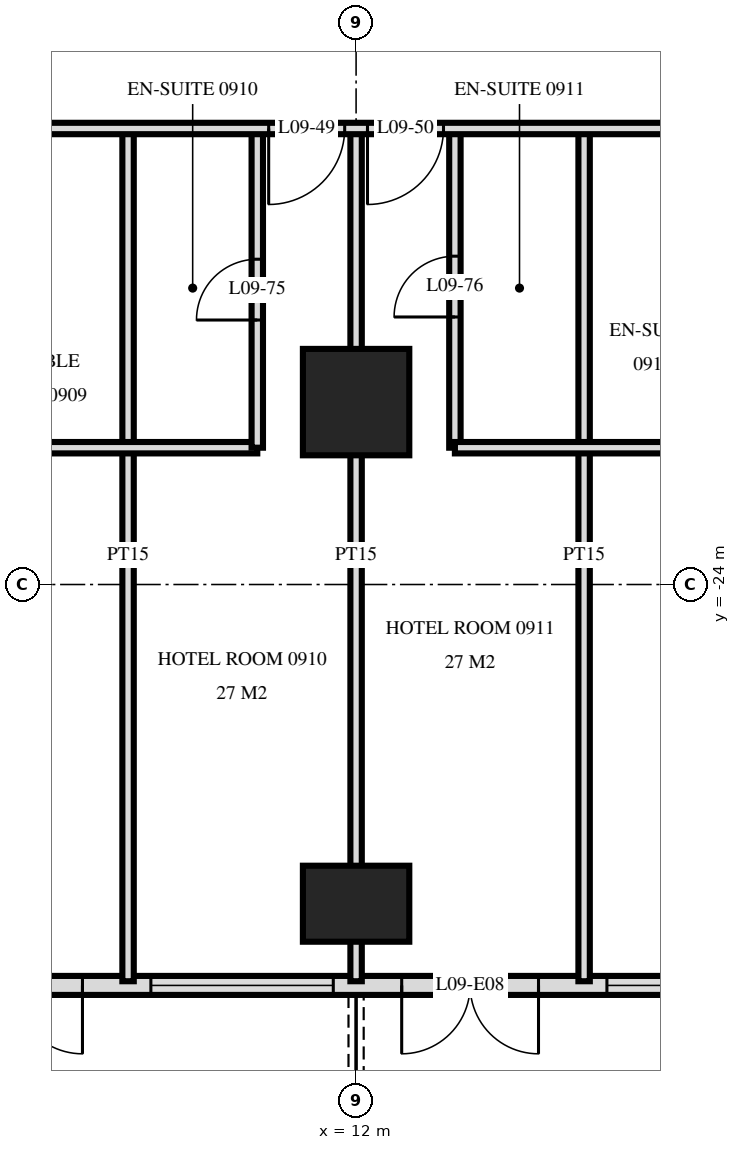
"""IFC4 building model, lengths in metres.
Left out: names, types, materials, properties, quantities, classifications, styles, units other than length and angle.
Written with IfcOpenShell. Run it as: python <this file> out.ifc"""

import sys

from ifc_helpers import new_model, si_unit, direction, frame, frame_2d, origin, origin_2d, place, context, subcontext, project, spatial, rectangle, extrude, element, fill, save


model = new_model("IFC4")
c1 = context("Model", 3, precision=1e-05, world=origin(), true_north=direction((0.0, 1.0)))
c2 = subcontext(c1, "Body", "Model", "MODEL_VIEW")
j1 = project(units=[si_unit("LENGTHUNIT", "METRE"), si_unit("PLANEANGLEUNIT", "RADIAN")], contexts=[c1])
p1 = place(None, origin())
s1 = spatial("IfcSite", under=j1, at=p1, CompositionType="ELEMENT")
p2 = place(p1, origin())
s2 = spatial("IfcBuilding", under=s1, at=p2, CompositionType="ELEMENT")
p3 = place(p2, frame((0.0, 0.0, 42.0)))
s3 = spatial("IfcBuildingStorey", under=s2, at=p3, CompositionType="ELEMENT", Elevation=42.0)
p4 = place(p3, frame((12.0, -28.2, 0.0), z_axis=(0.0, 0.0, 1.0), x_axis=(1.0, 0.0, 0.0)))
e1 = element("IfcColumn", 1, at=p4, inside=s3, PredefinedType="COLUMN", context=c2, shape_type="SweptSolid", body=[
    extrude(rectangle(XDim=1.4, YDim=1.0, at=origin_2d()), origin(), (0.0, 0.0, 1.0), 3.6),
])
p5 = place(p3, frame((12.0, -21.6, 0.0), z_axis=(0.0, 0.0, 1.0), x_axis=(1.0, 0.0, 0.0)))
e2 = element("IfcColumn", 2, at=p5, inside=s3, PredefinedType="COLUMN", context=c2, shape_type="SweptSolid", body=[
    extrude(rectangle(XDim=1.4, YDim=1.4, at=origin_2d()), origin(), (0.0, 0.0, 1.0), 3.6),
])
p6 = place(p3, frame((-28.775, -29.275, 0.0), z_axis=(0.0, 0.0, 1.0), x_axis=(1.0, 0.0, 0.0)))
e3 = element("IfcWall", 3, at=p6, inside=s3, PredefinedType="SOLIDWALL", context=c2, shape_type="SweptSolid", body=[
    extrude(rectangle(XDim=57.551, YDim=0.25, at=frame_2d((28.775, 0.0))), origin(), (0.0, 0.0, 1.0), 3.32),
])
p7 = place(p6, frame((0.575, 0.0, 0.0)))
e4 = element("IfcOpeningElement", 4, at=p7, cuts=e3, PredefinedType="OPENING", context=c2, shape_type="SweptSolid", body=[
    extrude(rectangle(XDim=1.8, YDim=2.4, at=frame_2d((0.9, 1.2))), frame((0.0, 0.135, 0.0), z_axis=(0.0, -1.0, 0.0), x_axis=(1.0, 0.0, 0.0)), (0.0, 0.0, 1.0), 0.27),
])
p8 = place(p6, frame((5.375, 0.0, 0.0)))
e5 = element("IfcOpeningElement", 5, at=p8, cuts=e3, PredefinedType="OPENING", context=c2, shape_type="SweptSolid", body=[
    extrude(rectangle(XDim=1.8, YDim=2.4, at=frame_2d((0.9, 1.2))), frame((0.0, 0.135, 0.0), z_axis=(0.0, -1.0, 0.0), x_axis=(1.0, 0.0, 0.0)), (0.0, 0.0, 1.0), 0.27),
])
p9 = place(p6, frame((8.075, 0.0, 0.3)))
e6 = element("IfcOpeningElement", 6, at=p9, cuts=e3, PredefinedType="OPENING", context=c2, shape_type="SweptSolid", body=[
    extrude(rectangle(XDim=2.4, YDim=2.1, at=frame_2d((1.2, 1.05))), frame((0.0, 0.135, 0.0), z_axis=(0.0, -1.0, 0.0), x_axis=(1.0, 0.0, 0.0)), (0.0, 0.0, 1.0), 0.27),
])
p10 = place(p6, frame((11.375, 0.0, 0.0)))
e7 = element("IfcOpeningElement", 7, at=p10, cuts=e3, PredefinedType="OPENING", context=c2, shape_type="SweptSolid", body=[
    extrude(rectangle(XDim=1.8, YDim=2.4, at=frame_2d((0.9, 1.2))), frame((0.0, 0.135, 0.0), z_axis=(0.0, -1.0, 0.0), x_axis=(1.0, 0.0, 0.0)), (0.0, 0.0, 1.0), 0.27),
])
p11 = place(p6, frame((14.075, 0.0, 0.3)))
e8 = element("IfcOpeningElement", 8, at=p11, cuts=e3, PredefinedType="OPENING", context=c2, shape_type="SweptSolid", body=[
    extrude(rectangle(XDim=2.4, YDim=2.1, at=frame_2d((1.2, 1.05))), frame((0.0, 0.135, 0.0), z_axis=(0.0, -1.0, 0.0), x_axis=(1.0, 0.0, 0.0)), (0.0, 0.0, 1.0), 0.27),
])
p12 = place(p6, frame((17.375, 0.0, 0.0)))
e9 = element("IfcOpeningElement", 9, at=p12, cuts=e3, PredefinedType="OPENING", context=c2, shape_type="SweptSolid", body=[
    extrude(rectangle(XDim=1.8, YDim=2.4, at=frame_2d((0.9, 1.2))), frame((0.0, 0.135, 0.0), z_axis=(0.0, -1.0, 0.0), x_axis=(1.0, 0.0, 0.0)), (0.0, 0.0, 1.0), 0.27),
])
p13 = place(p6, frame((20.075, 0.0, 0.3)))
e10 = element("IfcOpeningElement", 10, at=p13, cuts=e3, PredefinedType="OPENING", context=c2, shape_type="SweptSolid", body=[
    extrude(rectangle(XDim=2.4, YDim=2.1, at=frame_2d((1.2, 1.05))), frame((0.0, 0.135, 0.0), z_axis=(0.0, -1.0, 0.0), x_axis=(1.0, 0.0, 0.0)), (0.0, 0.0, 1.0), 0.27),
])
p14 = place(p6, frame((23.075, 0.0, 0.3)))
e11 = element("IfcOpeningElement", 11, at=p14, cuts=e3, PredefinedType="OPENING", context=c2, shape_type="SweptSolid", body=[
    extrude(rectangle(XDim=2.4, YDim=2.1, at=frame_2d((1.2, 1.05))), frame((0.0, 0.135, 0.0), z_axis=(0.0, -1.0, 0.0), x_axis=(1.0, 0.0, 0.0)), (0.0, 0.0, 1.0), 0.27),
])
p15 = place(p6, frame((26.375, 0.0, 0.0)))
e12 = element("IfcOpeningElement", 12, at=p15, cuts=e3, PredefinedType="OPENING", context=c2, shape_type="SweptSolid", body=[
    extrude(rectangle(XDim=1.8, YDim=2.4, at=frame_2d((0.9, 1.2))), frame((0.0, 0.135, 0.0), z_axis=(0.0, -1.0, 0.0), x_axis=(1.0, 0.0, 0.0)), (0.0, 0.0, 1.0), 0.27),
])
p16 = place(p6, frame((29.375, 0.0, 0.0)))
e13 = element("IfcOpeningElement", 13, at=p16, cuts=e3, PredefinedType="OPENING", context=c2, shape_type="SweptSolid", body=[
    extrude(rectangle(XDim=1.8, YDim=2.4, at=frame_2d((0.9, 1.2))), frame((0.0, 0.135, 0.0), z_axis=(0.0, -1.0, 0.0), x_axis=(1.0, 0.0, 0.0)), (0.0, 0.0, 1.0), 0.27),
])
p17 = place(p6, frame((32.075, 0.0, 0.3)))
e14 = element("IfcOpeningElement", 14, at=p17, cuts=e3, PredefinedType="OPENING", context=c2, shape_type="SweptSolid", body=[
    extrude(rectangle(XDim=2.4, YDim=2.1, at=frame_2d((1.2, 1.05))), frame((0.0, 0.135, 0.0), z_axis=(0.0, -1.0, 0.0), x_axis=(1.0, 0.0, 0.0)), (0.0, 0.0, 1.0), 0.27),
])
p18 = place(p6, frame((35.375, 0.0, 0.0)))
e15 = element("IfcOpeningElement", 15, at=p18, cuts=e3, PredefinedType="OPENING", context=c2, shape_type="SweptSolid", body=[
    extrude(rectangle(XDim=1.8, YDim=2.4, at=frame_2d((0.9, 1.2))), frame((0.0, 0.135, 0.0), z_axis=(0.0, -1.0, 0.0), x_axis=(1.0, 0.0, 0.0)), (0.0, 0.0, 1.0), 0.27),
])
p19 = place(p6, frame((38.075, 0.0, 0.3)))
e16 = element("IfcOpeningElement", 16, at=p19, cuts=e3, PredefinedType="OPENING", context=c2, shape_type="SweptSolid", body=[
    extrude(rectangle(XDim=2.4, YDim=2.1, at=frame_2d((1.2, 1.05))), frame((0.0, 0.135, 0.0), z_axis=(0.0, -1.0, 0.0), x_axis=(1.0, 0.0, 0.0)), (0.0, 0.0, 1.0), 0.27),
])
p20 = place(p6, frame((41.375, 0.0, 0.0)))
e17 = element("IfcOpeningElement", 17, at=p20, cuts=e3, PredefinedType="OPENING", context=c2, shape_type="SweptSolid", body=[
    extrude(rectangle(XDim=1.8, YDim=2.4, at=frame_2d((0.9, 1.2))), frame((0.0, 0.135, 0.0), z_axis=(0.0, -1.0, 0.0), x_axis=(1.0, 0.0, 0.0)), (0.0, 0.0, 1.0), 0.27),
])
p21 = place(p6, frame((44.075, 0.0, 0.3)))
e18 = element("IfcOpeningElement", 18, at=p21, cuts=e3, PredefinedType="OPENING", context=c2, shape_type="SweptSolid", body=[
    extrude(rectangle(XDim=2.4, YDim=2.1, at=frame_2d((1.2, 1.05))), frame((0.0, 0.135, 0.0), z_axis=(0.0, -1.0, 0.0), x_axis=(1.0, 0.0, 0.0)), (0.0, 0.0, 1.0), 0.27),
])
p22 = place(p6, frame((47.375, 0.0, 0.0)))
e19 = element("IfcOpeningElement", 19, at=p22, cuts=e3, PredefinedType="OPENING", context=c2, shape_type="SweptSolid", body=[
    extrude(rectangle(XDim=1.8, YDim=2.4, at=frame_2d((0.9, 1.2))), frame((0.0, 0.135, 0.0), z_axis=(0.0, -1.0, 0.0), x_axis=(1.0, 0.0, 0.0)), (0.0, 0.0, 1.0), 0.27),
])
p23 = place(p6, frame((50.075, 0.0, 0.3)))
e20 = element("IfcOpeningElement", 20, at=p23, cuts=e3, PredefinedType="OPENING", context=c2, shape_type="SweptSolid", body=[
    extrude(rectangle(XDim=2.4, YDim=2.1, at=frame_2d((1.2, 1.05))), frame((0.0, 0.135, 0.0), z_axis=(0.0, -1.0, 0.0), x_axis=(1.0, 0.0, 0.0)), (0.0, 0.0, 1.0), 0.27),
])
p24 = place(p6, frame((53.375, 0.0, 0.0)))
e21 = element("IfcOpeningElement", 21, at=p24, cuts=e3, PredefinedType="OPENING", context=c2, shape_type="SweptSolid", body=[
    extrude(rectangle(XDim=1.8, YDim=2.4, at=frame_2d((0.9, 1.2))), frame((0.0, 0.135, 0.0), z_axis=(0.0, -1.0, 0.0), x_axis=(1.0, 0.0, 0.0)), (0.0, 0.0, 1.0), 0.27),
])
p25 = place(p3, frame((15.0, -29.22, 0.0), z_axis=(0.0, 0.0, 1.0), x_axis=(0.0, 1.0, 0.0)))
e22 = element("IfcWall", 22, at=p25, inside=s3, PredefinedType="PARTITIONING", context=c2, shape_type="SweptSolid", body=[
    extrude(rectangle(XDim=11.22, YDim=0.15, at=frame_2d((5.61, 0.0))), origin(), (0.0, 0.0, 1.0), 3.32),
])
p26 = place(p3, frame((13.3, -22.2, 0.0), z_axis=(0.0, 0.0, 1.0), x_axis=(0.0, 1.0, 0.0)))
e23 = element("IfcWall", 23, at=p26, inside=s3, PredefinedType="PARTITIONING", context=c2, shape_type="SweptSolid", body=[
    extrude(rectangle(XDim=4.2, YDim=0.15, at=frame_2d((2.1, 0.0))), origin(), (0.0, 0.0, 1.0), 3.32),
])
p27 = place(p26, frame((1.72, 0.0, 0.0)))
e24 = element("IfcOpeningElement", 24, at=p27, cuts=e23, PredefinedType="OPENING", context=c2, shape_type="SweptSolid", body=[
    extrude(rectangle(XDim=0.8, YDim=2.1, at=frame_2d((0.4, 1.05))), frame((0.0, 0.085, 0.0), z_axis=(0.0, -1.0, 0.0), x_axis=(1.0, 0.0, 0.0)), (0.0, 0.0, 1.0), 0.17),
])
p28 = place(p3, frame((12.0, -29.22, 0.0), z_axis=(0.0, 0.0, 1.0), x_axis=(0.0, 1.0, 0.0)))
e25 = element("IfcWall", 25, at=p28, inside=s3, PredefinedType="PARTITIONING", context=c2, shape_type="SweptSolid", body=[
    extrude(rectangle(XDim=11.22, YDim=0.15, at=frame_2d((5.61, 0.0))), origin(), (0.0, 0.0, 1.0), 3.32),
])
p29 = place(p3, frame((10.7, -22.2, 0.0), z_axis=(0.0, 0.0, 1.0), x_axis=(0.0, 1.0, 0.0)))
e26 = element("IfcWall", 26, at=p29, inside=s3, PredefinedType="PARTITIONING", context=c2, shape_type="SweptSolid", body=[
    extrude(rectangle(XDim=4.2, YDim=0.15, at=frame_2d((2.1, 0.0))), origin(), (0.0, 0.0, 1.0), 3.32),
])
p30 = place(p29, frame((1.68, 0.0, 0.0)))
e27 = element("IfcOpeningElement", 27, at=p30, cuts=e26, PredefinedType="OPENING", context=c2, shape_type="SweptSolid", body=[
    extrude(rectangle(XDim=0.8, YDim=2.1, at=frame_2d((0.4, 1.05))), frame((0.0, 0.085, 0.0), z_axis=(0.0, -1.0, 0.0), x_axis=(1.0, 0.0, 0.0)), (0.0, 0.0, 1.0), 0.17),
])
p31 = place(p3, frame((9.0, -29.22, 0.0), z_axis=(0.0, 0.0, 1.0), x_axis=(0.0, 1.0, 0.0)))
e28 = element("IfcWall", 28, at=p31, inside=s3, PredefinedType="PARTITIONING", context=c2, shape_type="SweptSolid", body=[
    extrude(rectangle(XDim=11.22, YDim=0.15, at=frame_2d((5.61, 0.0))), origin(), (0.0, 0.0, 1.0), 3.32),
])
for number, where, z_axis, x_axis in (
    (29, (6.3, -22.2, 0.0), (0.0, 0.0, 1.0), (1.0, 0.0, 0.0)),
    (30, (13.3, -22.2, 0.0), (0.0, 0.0, 1.0), (1.0, 0.0, 0.0)),
):
    element("IfcWall", number, at=place(p3, frame(where, z_axis=z_axis, x_axis=x_axis)), inside=s3, PredefinedType="PARTITIONING", context=c2, shape_type="SweptSolid", body=[
        extrude(rectangle(XDim=4.4, YDim=0.15, at=frame_2d((2.2, 0.0))), origin(), (0.0, 0.0, 1.0), 3.32),
    ])
p32 = place(p3, frame((-33.12, -18.0, 0.0), z_axis=(0.0, 0.0, 1.0), x_axis=(1.0, 0.0, 0.0)))
e31 = element("IfcWall", 31, at=p32, inside=s3, PredefinedType="PARTITIONING", context=c2, shape_type="SweptSolid", body=[
    extrude(rectangle(XDim=66.24, YDim=0.15, at=frame_2d((33.12, 0.0))), origin(), (0.0, 0.0, 1.0), 3.32),
])
p33 = place(p32, frame((12.27, 0.0, 0.0)))
e32 = element("IfcOpeningElement", 32, at=p33, cuts=e31, PredefinedType="OPENING", context=c2, shape_type="SweptSolid", body=[
    extrude(rectangle(XDim=1.0, YDim=2.1, at=frame_2d((0.5, 1.05))), frame((0.0, 0.085, 0.0), z_axis=(0.0, -1.0, 0.0), x_axis=(1.0, 0.0, 0.0)), (0.0, 0.0, 1.0), 0.17),
])
p34 = place(p32, frame((16.97, 0.0, 0.0)))
e33 = element("IfcOpeningElement", 33, at=p34, cuts=e31, PredefinedType="OPENING", context=c2, shape_type="SweptSolid", body=[
    extrude(rectangle(XDim=1.0, YDim=2.1, at=frame_2d((0.5, 1.05))), frame((0.0, 0.085, 0.0), z_axis=(0.0, -1.0, 0.0), x_axis=(1.0, 0.0, 0.0)), (0.0, 0.0, 1.0), 0.17),
])
p35 = place(p32, frame((18.27, 0.0, 0.0)))
e34 = element("IfcOpeningElement", 34, at=p35, cuts=e31, PredefinedType="OPENING", context=c2, shape_type="SweptSolid", body=[
    extrude(rectangle(XDim=1.0, YDim=2.1, at=frame_2d((0.5, 1.05))), frame((0.0, 0.085, 0.0), z_axis=(0.0, -1.0, 0.0), x_axis=(1.0, 0.0, 0.0)), (0.0, 0.0, 1.0), 0.17),
])
p36 = place(p32, frame((22.97, 0.0, 0.0)))
e35 = element("IfcOpeningElement", 35, at=p36, cuts=e31, PredefinedType="OPENING", context=c2, shape_type="SweptSolid", body=[
    extrude(rectangle(XDim=1.0, YDim=2.1, at=frame_2d((0.5, 1.05))), frame((0.0, 0.085, 0.0), z_axis=(0.0, -1.0, 0.0), x_axis=(1.0, 0.0, 0.0)), (0.0, 0.0, 1.0), 0.17),
])
p37 = place(p32, frame((24.27, 0.0, 0.0)))
e36 = element("IfcOpeningElement", 36, at=p37, cuts=e31, PredefinedType="OPENING", context=c2, shape_type="SweptSolid", body=[
    extrude(rectangle(XDim=1.0, YDim=2.1, at=frame_2d((0.5, 1.05))), frame((0.0, 0.085, 0.0), z_axis=(0.0, -1.0, 0.0), x_axis=(1.0, 0.0, 0.0)), (0.0, 0.0, 1.0), 0.17),
])
p38 = place(p32, frame((28.97, 0.0, 0.0)))
e37 = element("IfcOpeningElement", 37, at=p38, cuts=e31, PredefinedType="OPENING", context=c2, shape_type="SweptSolid", body=[
    extrude(rectangle(XDim=1.0, YDim=2.1, at=frame_2d((0.5, 1.05))), frame((0.0, 0.085, 0.0), z_axis=(0.0, -1.0, 0.0), x_axis=(1.0, 0.0, 0.0)), (0.0, 0.0, 1.0), 0.17),
])
p39 = place(p32, frame((30.27, 0.0, 0.0)))
e38 = element("IfcOpeningElement", 38, at=p39, cuts=e31, PredefinedType="OPENING", context=c2, shape_type="SweptSolid", body=[
    extrude(rectangle(XDim=1.0, YDim=2.1, at=frame_2d((0.5, 1.05))), frame((0.0, 0.085, 0.0), z_axis=(0.0, -1.0, 0.0), x_axis=(1.0, 0.0, 0.0)), (0.0, 0.0, 1.0), 0.17),
])
p40 = place(p32, frame((34.97, 0.0, 0.0)))
e39 = element("IfcOpeningElement", 39, at=p40, cuts=e31, PredefinedType="OPENING", context=c2, shape_type="SweptSolid", body=[
    extrude(rectangle(XDim=1.0, YDim=2.1, at=frame_2d((0.5, 1.05))), frame((0.0, 0.085, 0.0), z_axis=(0.0, -1.0, 0.0), x_axis=(1.0, 0.0, 0.0)), (0.0, 0.0, 1.0), 0.17),
])
p41 = place(p32, frame((37.27, 0.0, 0.0)))
e40 = element("IfcOpeningElement", 40, at=p41, cuts=e31, PredefinedType="OPENING", context=c2, shape_type="SweptSolid", body=[
    extrude(rectangle(XDim=1.0, YDim=2.1, at=frame_2d((0.5, 1.05))), frame((0.0, 0.085, 0.0), z_axis=(0.0, -1.0, 0.0), x_axis=(1.0, 0.0, 0.0)), (0.0, 0.0, 1.0), 0.17),
])
p42 = place(p32, frame((43.97, 0.0, 0.0)))
e41 = element("IfcOpeningElement", 41, at=p42, cuts=e31, PredefinedType="OPENING", context=c2, shape_type="SweptSolid", body=[
    extrude(rectangle(XDim=1.0, YDim=2.1, at=frame_2d((0.5, 1.05))), frame((0.0, 0.085, 0.0), z_axis=(0.0, -1.0, 0.0), x_axis=(1.0, 0.0, 0.0)), (0.0, 0.0, 1.0), 0.17),
])
p43 = place(p32, frame((45.27, 0.0, 0.0)))
e42 = element("IfcOpeningElement", 42, at=p43, cuts=e31, PredefinedType="OPENING", context=c2, shape_type="SweptSolid", body=[
    extrude(rectangle(XDim=1.0, YDim=2.1, at=frame_2d((0.5, 1.05))), frame((0.0, 0.085, 0.0), z_axis=(0.0, -1.0, 0.0), x_axis=(1.0, 0.0, 0.0)), (0.0, 0.0, 1.0), 0.17),
])
p44 = place(p32, frame((51.22, 0.0, 0.0)))
e43 = element("IfcOpeningElement", 43, at=p44, cuts=e31, PredefinedType="OPENING", context=c2, shape_type="SweptSolid", body=[
    extrude(rectangle(XDim=1.0, YDim=2.1, at=frame_2d((0.5, 1.05))), frame((0.0, 0.085, 0.0), z_axis=(0.0, -1.0, 0.0), x_axis=(1.0, 0.0, 0.0)), (0.0, 0.0, 1.0), 0.17),
])
p45 = place(p32, frame((54.27, 0.0, 0.0)))
e44 = element("IfcOpeningElement", 44, at=p45, cuts=e31, PredefinedType="OPENING", context=c2, shape_type="SweptSolid", body=[
    extrude(rectangle(XDim=1.0, YDim=2.1, at=frame_2d((0.5, 1.05))), frame((0.0, 0.085, 0.0), z_axis=(0.0, -1.0, 0.0), x_axis=(1.0, 0.0, 0.0)), (0.0, 0.0, 1.0), 0.17),
])
p46 = place(p32, frame((6.07, 0.0, 0.0)))
e45 = element("IfcOpeningElement", 45, at=p46, cuts=e31, PredefinedType="OPENING", context=c2, shape_type="SweptSolid", body=[
    extrude(rectangle(XDim=1.0, YDim=2.1, at=frame_2d((0.5, 1.05))), frame((0.0, 0.085, 0.0), z_axis=(0.0, -1.0, 0.0), x_axis=(1.0, 0.0, 0.0)), (0.0, 0.0, 1.0), 0.17),
])
p47 = place(p32, frame((63.37, 0.0, 0.0)))
e46 = element("IfcOpeningElement", 46, at=p47, cuts=e31, PredefinedType="OPENING", context=c2, shape_type="SweptSolid", body=[
    extrude(rectangle(XDim=1.0, YDim=2.1, at=frame_2d((0.5, 1.05))), frame((0.0, 0.085, 0.0), z_axis=(0.0, -1.0, 0.0), x_axis=(1.0, 0.0, 0.0)), (0.0, 0.0, 1.0), 0.17),
])
p48 = place(p18, frame((0.9, 0.0, 0.0), z_axis=(0.0, 0.0, 1.0), x_axis=(-1.0, 0.0, 0.0)))
e47 = element("IfcDoor", 47, at=p48, inside=s3, OperationType="DOUBLE_DOOR_SINGLE_SWING", PredefinedType="DOOR", context=c2, shape_type="SweptSolid", body=[
    extrude(rectangle(XDim=1.8, YDim=2.4, at=frame_2d((0.0, 1.2))), frame((0.0, -0.025, 0.0), z_axis=(0.0, 1.0, 0.0), x_axis=(-1.0, 0.0, 0.0)), (0.0, 0.0, 1.0), 0.05),
])
fill(e15, e47)
p49 = place(p19, origin())
e48 = element("IfcWindow", 48, at=p49, inside=s3, PartitioningType="SINGLE_PANEL", PredefinedType="WINDOW", context=c2, shape_type="SweptSolid", body=[
    extrude(rectangle(XDim=2.4, YDim=2.1, at=frame_2d((1.2, 1.05))), frame((0.0, 0.03, 0.0), z_axis=(0.0, -1.0, 0.0), x_axis=(1.0, 0.0, 0.0)), (0.0, 0.0, 1.0), 0.06),
])
fill(e16, e48)
p50 = place(p20, frame((0.9, 0.0, 0.0), z_axis=(0.0, 0.0, 1.0), x_axis=(-1.0, 0.0, 0.0)))
e49 = element("IfcDoor", 49, at=p50, inside=s3, OperationType="DOUBLE_DOOR_SINGLE_SWING", PredefinedType="DOOR", context=c2, shape_type="SweptSolid", body=[
    extrude(rectangle(XDim=1.8, YDim=2.4, at=frame_2d((0.0, 1.2))), frame((0.0, -0.025, 0.0), z_axis=(0.0, 1.0, 0.0), x_axis=(-1.0, 0.0, 0.0)), (0.0, 0.0, 1.0), 0.05),
])
fill(e17, e49)
p51 = place(p21, origin())
e50 = element("IfcWindow", 50, at=p51, inside=s3, PartitioningType="SINGLE_PANEL", PredefinedType="WINDOW", context=c2, shape_type="SweptSolid", body=[
    extrude(rectangle(XDim=2.4, YDim=2.1, at=frame_2d((1.2, 1.05))), frame((0.0, 0.03, 0.0), z_axis=(0.0, -1.0, 0.0), x_axis=(1.0, 0.0, 0.0)), (0.0, 0.0, 1.0), 0.06),
])
fill(e18, e50)
p52 = place(p42, frame((0.5, 0.0, 0.0), z_axis=(0.0, 0.0, 1.0), x_axis=(-1.0, 0.0, 0.0)))
e51 = element("IfcDoor", 51, at=p52, inside=s3, OperationType="SINGLE_SWING_LEFT", PredefinedType="DOOR", context=c2, shape_type="SweptSolid", body=[
    extrude(rectangle(XDim=1.0, YDim=2.1, at=frame_2d((0.0, 1.05))), frame((0.0, -0.025, 0.0), z_axis=(0.0, 1.0, 0.0), x_axis=(-1.0, 0.0, 0.0)), (0.0, 0.0, 1.0), 0.05),
])
fill(e41, e51)
p53 = place(p43, frame((0.5, 0.0, 0.0), z_axis=(0.0, 0.0, 1.0), x_axis=(-1.0, 0.0, 0.0)))
e52 = element("IfcDoor", 52, at=p53, inside=s3, OperationType="SINGLE_SWING_LEFT", PredefinedType="DOOR", context=c2, shape_type="SweptSolid", body=[
    extrude(rectangle(XDim=1.0, YDim=2.1, at=frame_2d((0.0, 1.05))), frame((0.0, -0.025, 0.0), z_axis=(0.0, 1.0, 0.0), x_axis=(-1.0, 0.0, 0.0)), (0.0, 0.0, 1.0), 0.05),
])
fill(e42, e52)
p54 = place(p30, origin())
e53 = element("IfcDoor", 53, at=p54, inside=s3, OperationType="SINGLE_SWING_RIGHT", PredefinedType="DOOR", context=c2, shape_type="SweptSolid", body=[
    extrude(rectangle(XDim=0.8, YDim=2.1, at=frame_2d((0.4, 1.05))), frame((0.0, 0.025, 0.0), z_axis=(0.0, -1.0, 0.0), x_axis=(1.0, 0.0, 0.0)), (0.0, 0.0, 1.0), 0.05),
])
fill(e27, e53)
p55 = place(p27, origin())
e54 = element("IfcDoor", 54, at=p55, inside=s3, OperationType="SINGLE_SWING_RIGHT", PredefinedType="DOOR", context=c2, shape_type="SweptSolid", body=[
    extrude(rectangle(XDim=0.8, YDim=2.1, at=frame_2d((0.4, 1.05))), frame((0.0, 0.025, 0.0), z_axis=(0.0, -1.0, 0.0), x_axis=(1.0, 0.0, 0.0)), (0.0, 0.0, 1.0), 0.05),
])
fill(e24, e54)
save(model, sys.argv[1])
